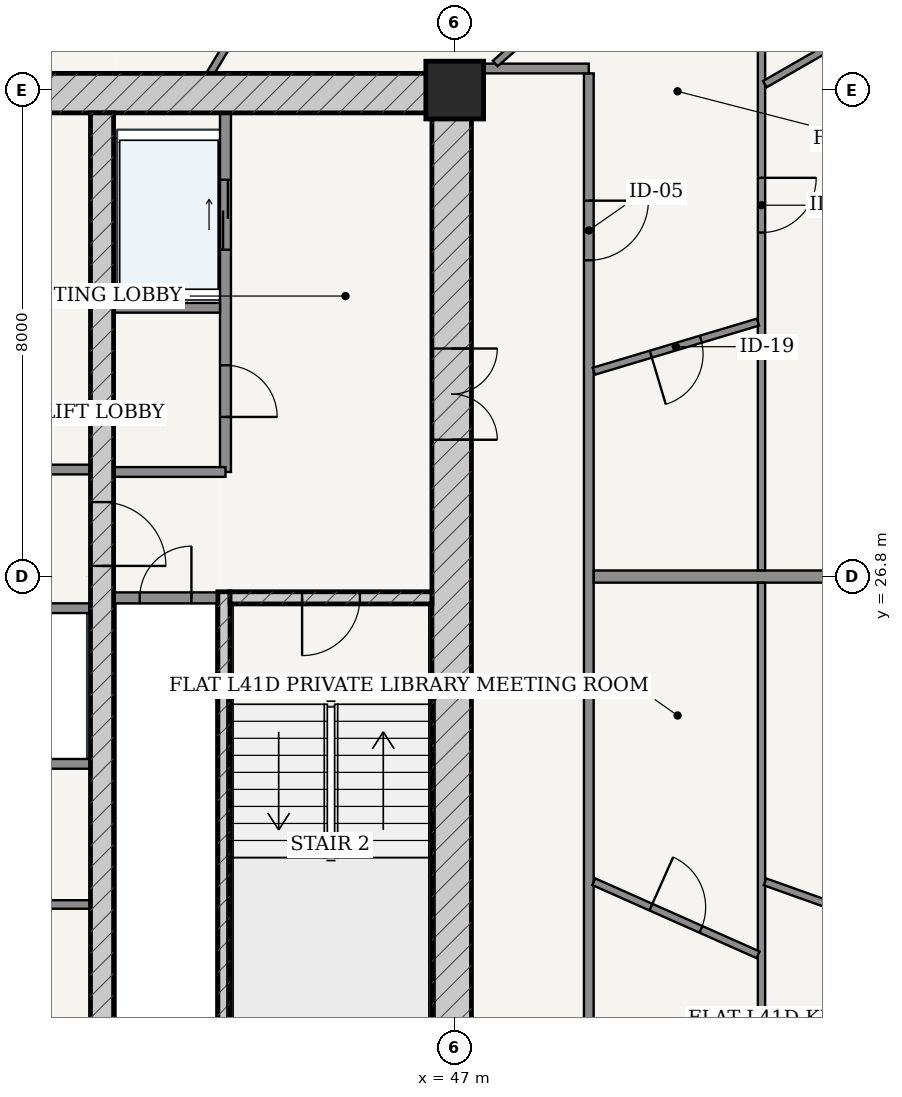
"""IFC4 building model, lengths in metres.
Left out: names, types, materials, properties, quantities, classifications, styles, units other than length and angle.
Written with IfcOpenShell. Run it as: python <this file> out.ifc"""

import sys

from ifc_helpers import new_model, si_unit, direction, frame, frame_2d, origin, origin_2d, place, context, subcontext, project, spatial, rectangle, extrude, source, transform, mapped, element, fill, save


model = new_model("IFC4")
c1 = context("Model", 3, precision=1e-05, world=origin(), true_north=direction((-0.2419218956, 0.970295726276)))
c2 = subcontext(c1, "Body", "Model", "MODEL_VIEW")
j1 = project(units=[si_unit("LENGTHUNIT", "METRE"), si_unit("PLANEANGLEUNIT", "RADIAN")], contexts=[c1])
p1 = place(None, origin())
s1 = spatial("IfcSite", under=j1, at=p1, CompositionType="ELEMENT")
p2 = place(p1, origin())
s2 = spatial("IfcBuilding", under=s1, at=p2, CompositionType="ELEMENT")
p3 = place(p2, frame((0.0, 0.0, 157.0)))
s3 = spatial("IfcBuildingStorey", under=s2, at=p3, CompositionType="ELEMENT", Elevation=157.0)
p4 = place(p3, frame((47.0, 34.8, 0.0), z_axis=(0.0, 0.0, 1.0), x_axis=(1.0, 0.0, 0.0)))
e1 = element("IfcColumn", 1, at=p4, inside=s3, PredefinedType="COLUMN", context=c2, shape_type="SweptSolid", body=[
    extrude(rectangle(XDim=0.95, YDim=0.95, at=origin_2d()), origin(), (0.0, 0.0, 1.0), 3.6),
])
p5 = place(p3, frame((28.725, 34.75, 0.0), z_axis=(0.0, 0.0, 1.0), x_axis=(1.0, 0.0, 0.0)))
e2 = element("IfcWall", 2, at=p5, inside=s3, PredefinedType="SHEAR", context=c2, shape_type="SweptSolid", body=[
    extrude(rectangle(XDim=18.55, YDim=0.65, at=frame_2d((9.275, 0.0))), origin(), (0.0, 0.0, 1.0), 3.33),
])
p6 = place(p3, frame((46.95, 19.175, 0.0), z_axis=(0.0, 0.0, 1.0), x_axis=(0.0, 1.0, 0.0)))
e3 = element("IfcWall", 3, at=p6, inside=s3, PredefinedType="SHEAR", context=c2, shape_type="SweptSolid", body=[
    extrude(rectangle(XDim=15.25, YDim=0.65, at=frame_2d((7.625, 0.0))), origin(), (0.0, 0.0, 1.0), 3.33),
])
p7 = place(p6, frame((9.875, 0.0, 0.0)))
e4 = element("IfcOpeningElement", 4, at=p7, cuts=e3, PredefinedType="OPENING", context=c2, shape_type="SweptSolid", body=[
    extrude(rectangle(XDim=1.5, YDim=2.2, at=frame_2d((0.75, 1.1))), frame((0.0, 0.335, 0.0), z_axis=(0.0, -1.0, 0.0), x_axis=(1.0, 0.0, 0.0)), (0.0, 0.0, 1.0), 0.67),
])
p8 = place(p3, frame((43.205, 19.175, 0.0), z_axis=(0.0, 0.0, 1.0), x_axis=(0.0, 1.0, 0.0)))
e5 = element("IfcWall", 5, at=p8, inside=s3, PredefinedType="SOLIDWALL", context=c2, shape_type="SweptSolid", body=[
    extrude(rectangle(XDim=7.375, YDim=0.2, at=frame_2d((3.688, 0.0))), origin(), (0.0, 0.0, 1.0), 3.33),
])
p9 = place(p3, frame((43.305, 26.45, 0.0), z_axis=(0.0, 0.0, 1.0), x_axis=(1.0, 0.0, 0.0)))
e6 = element("IfcWall", 6, at=p9, inside=s3, PredefinedType="SOLIDWALL", context=c2, shape_type="SweptSolid", body=[
    extrude(rectangle(XDim=3.32, YDim=0.2, at=frame_2d((1.66, 0.0))), origin(), (0.0, 0.0, 1.0), 3.33),
])
p10 = place(p9, frame((1.185, 0.0, 0.0)))
e7 = element("IfcOpeningElement", 7, at=p10, cuts=e6, PredefinedType="OPENING", context=c2, shape_type="SweptSolid", body=[
    extrude(rectangle(XDim=0.95, YDim=2.15, at=frame_2d((0.475, 1.075))), frame((0.0, 0.11, 0.0), z_axis=(0.0, -1.0, 0.0), x_axis=(1.0, 0.0, 0.0)), (0.0, 0.0, 1.0), 0.22),
])
p11 = place(p3, frame((41.2, 19.175, 0.0), z_axis=(0.0, 0.0, 1.0), x_axis=(0.0, 1.0, 0.0)))
e8 = element("IfcWall", 8, at=p11, inside=s3, PredefinedType="SHEAR", context=c2, shape_type="SweptSolid", body=[
    extrude(rectangle(XDim=15.25, YDim=0.38, at=frame_2d((7.625, 0.0))), origin(), (0.0, 0.0, 1.0), 3.33),
])
p12 = place(p11, frame((7.8, 0.0, 0.0)))
e9 = element("IfcOpeningElement", 9, at=p12, cuts=e8, PredefinedType="OPENING", context=c2, shape_type="SweptSolid", body=[
    extrude(rectangle(XDim=1.05, YDim=2.15, at=frame_2d((0.525, 1.075))), frame((0.0, 0.2, 0.0), z_axis=(0.0, -1.0, 0.0), x_axis=(1.0, 0.0, 0.0)), (0.0, 0.0, 1.0), 0.4),
])
p13 = place(p3, frame((41.39, 26.45, 0.0), z_axis=(0.0, 0.0, 1.0), x_axis=(1.0, 0.0, 0.0)))
e10 = element("IfcWall", 10, at=p13, inside=s3, PredefinedType="PARTITIONING", context=c2, shape_type="SweptSolid", body=[
    extrude(rectangle(XDim=1.71, YDim=0.18, at=frame_2d((0.855, 0.0))), origin(), (0.0, 0.0, 1.0), 3.33),
])
p14 = place(p13, frame((0.43, 0.0, 0.0)))
e11 = element("IfcOpeningElement", 11, at=p14, cuts=e10, PredefinedType="OPENING", context=c2, shape_type="SweptSolid", body=[
    extrude(rectangle(XDim=0.85, YDim=2.1, at=frame_2d((0.425, 1.05))), frame((0.0, 0.1, 0.0), z_axis=(0.0, -1.0, 0.0), x_axis=(1.0, 0.0, 0.0)), (0.0, 0.0, 1.0), 0.2),
])
p15 = place(p3, frame((43.23, 28.52, 0.0), z_axis=(0.0, 0.0, 1.0), x_axis=(0.0, 1.0, 0.0)))
e12 = element("IfcWall", 12, at=p15, inside=s3, PredefinedType="PARTITIONING", context=c2, shape_type="SweptSolid", body=[
    extrude(rectangle(XDim=5.905, YDim=0.18, at=frame_2d((2.953, 0.0))), origin(), (0.0, 0.0, 1.0), 3.33),
])
p16 = place(p15, frame((0.905, 0.0, 0.0)))
e13 = element("IfcOpeningElement", 13, at=p16, cuts=e12, PredefinedType="OPENING", context=c2, shape_type="SweptSolid", body=[
    extrude(rectangle(XDim=0.85, YDim=2.1, at=frame_2d((0.425, 1.05))), frame((0.0, 0.1, 0.0), z_axis=(0.0, -1.0, 0.0), x_axis=(1.0, 0.0, 0.0)), (0.0, 0.0, 1.0), 0.2),
])
p17 = place(p15, frame((3.655, 0.0, 0.0)))
e14 = element("IfcOpeningElement", 14, at=p17, cuts=e12, PredefinedType="OPENING", context=c2, shape_type="SweptSolid", body=[
    extrude(rectangle(XDim=1.15, YDim=2.2, at=frame_2d((0.575, 1.1))), frame((0.0, 0.1, 0.0), z_axis=(0.0, -1.0, 0.0), x_axis=(1.0, 0.0, 0.0)), (0.0, 0.0, 1.0), 0.2),
])
p18 = place(p3, frame((41.39, 31.22, 0.0), z_axis=(0.0, 0.0, 1.0), x_axis=(1.0, 0.0, 0.0)))
e15 = element("IfcWall", 15, at=p18, inside=s3, PredefinedType="PARTITIONING", context=c2, shape_type="SweptSolid", body=[
    extrude(rectangle(XDim=1.75, YDim=0.16, at=frame_2d((0.875, 0.0))), origin(), (0.0, 0.0, 1.0), 3.33),
])
p19 = place(p3, frame((41.39, 28.52, 0.0), z_axis=(0.0, 0.0, 1.0), x_axis=(1.0, 0.0, 0.0)))
e16 = element("IfcWall", 16, at=p19, inside=s3, PredefinedType="PARTITIONING", context=c2, shape_type="SweptSolid", body=[
    extrude(rectangle(XDim=1.84, YDim=0.16, at=frame_2d((0.92, 0.0))), origin(), (0.0, 0.0, 1.0), 3.33),
])
p20 = place(p3, frame((34.99, 28.56, 0.0), z_axis=(0.0, 0.0, 1.0), x_axis=(1.0, 0.0, 0.0)))
e17 = element("IfcWall", 17, at=p20, inside=s3, PredefinedType="PARTITIONING", context=c2, shape_type="SweptSolid", body=[
    extrude(rectangle(XDim=6.02, YDim=0.16, at=frame_2d((3.01, 0.0))), origin(), (0.0, 0.0, 1.0), 3.33),
])
p21 = place(p20, frame((2.585, 0.0, 0.0)))
e18 = element("IfcOpeningElement", 18, at=p21, cuts=e17, PredefinedType="OPENING", context=c2, shape_type="SweptSolid", body=[
    extrude(rectangle(XDim=0.85, YDim=2.1, at=frame_2d((0.425, 1.05))), frame((0.0, 0.09, 0.0), z_axis=(0.0, -1.0, 0.0), x_axis=(1.0, 0.0, 0.0)), (0.0, 0.0, 1.0), 0.18),
])
p22 = place(p3, frame((34.99, 26.28, 0.0), z_axis=(0.0, 0.0, 1.0), x_axis=(1.0, 0.0, 0.0)))
e19 = element("IfcWall", 19, at=p22, inside=s3, PredefinedType="PARTITIONING", context=c2, shape_type="SweptSolid", body=[
    extrude(rectangle(XDim=6.02, YDim=0.16, at=frame_2d((3.01, 0.0))), origin(), (0.0, 0.0, 1.0), 3.33),
])
p23 = place(p22, frame((0.225, 0.0, 0.0)))
e20 = element("IfcOpeningElement", 20, at=p23, cuts=e19, PredefinedType="OPENING", context=c2, shape_type="SweptSolid", body=[
    extrude(rectangle(XDim=1.1, YDim=2.2, at=frame_2d((0.55, 1.1))), frame((0.0, 0.09, 0.0), z_axis=(0.0, -1.0, 0.0), x_axis=(1.0, 0.0, 0.0)), (0.0, 0.0, 1.0), 0.18),
])
p24 = place(p22, frame((1.705, 0.0, 0.0)))
e21 = element("IfcOpeningElement", 21, at=p24, cuts=e19, PredefinedType="OPENING", context=c2, shape_type="SweptSolid", body=[
    extrude(rectangle(XDim=1.1, YDim=2.2, at=frame_2d((0.55, 1.1))), frame((0.0, 0.09, 0.0), z_axis=(0.0, -1.0, 0.0), x_axis=(1.0, 0.0, 0.0)), (0.0, 0.0, 1.0), 0.18),
])
p25 = place(p3, frame((34.99, 23.72, 0.0), z_axis=(0.0, 0.0, 1.0), x_axis=(1.0, 0.0, 0.0)))
e22 = element("IfcWall", 22, at=p25, inside=s3, PredefinedType="PARTITIONING", context=c2, shape_type="SweptSolid", body=[
    extrude(rectangle(XDim=6.02, YDim=0.16, at=frame_2d((3.01, 0.0))), origin(), (0.0, 0.0, 1.0), 3.33),
])
p26 = place(p3, frame((34.99, 21.407, 0.0), z_axis=(0.0, 0.0, 1.0), x_axis=(1.0, 0.0, 0.0)))
e23 = element("IfcWall", 23, at=p26, inside=s3, PredefinedType="PARTITIONING", context=c2, shape_type="SweptSolid", body=[
    extrude(rectangle(XDim=6.02, YDim=0.14, at=frame_2d((3.01, 0.0))), origin(), (0.0, 0.0, 1.0), 3.33),
])
p27 = place(p26, frame((2.585, 0.0, 0.0)))
e24 = element("IfcOpeningElement", 24, at=p27, cuts=e23, PredefinedType="OPENING", context=c2, shape_type="SweptSolid", body=[
    extrude(rectangle(XDim=0.85, YDim=2.1, at=frame_2d((0.425, 1.05))), frame((0.0, 0.08, 0.0), z_axis=(0.0, -1.0, 0.0), x_axis=(1.0, 0.0, 0.0)), (0.0, 0.0, 1.0), 0.16),
])
p28 = place(p3, frame((49.205, 16.675, 0.0), z_axis=(0.0, 0.0, 1.0), x_axis=(0.0, 1.0, 0.0)))
e25 = element("IfcWall", 25, at=p28, inside=s3, PredefinedType="PARTITIONING", context=c2, shape_type="SweptSolid", body=[
    extrude(rectangle(XDim=18.4, YDim=0.16, at=frame_2d((9.2, 0.0))), origin(), (0.0, 0.0, 1.0), 2.776),
])
p29 = place(p28, frame((15.326, 0.0, 0.0)))
e26 = element("IfcOpeningElement", 26, at=p29, cuts=e25, PredefinedType="OPENING", context=c2, shape_type="SweptSolid", body=[
    extrude(rectangle(XDim=0.98, YDim=2.2, at=frame_2d((0.49, 1.1))), frame((0.0, 0.09, 0.0), z_axis=(0.0, -1.0, 0.0), x_axis=(1.0, 0.0, 0.0)), (0.0, 0.0, 1.0), 0.18),
])
p30 = place(p3, frame((47.275, 35.155, 0.0), z_axis=(0.0, 0.0, 1.0), x_axis=(1.0, 0.0, 0.0)))
e27 = element("IfcWall", 27, at=p30, inside=s3, PredefinedType="PARTITIONING", context=c2, shape_type="SweptSolid", body=[
    extrude(rectangle(XDim=1.93, YDim=0.16, at=frame_2d((0.965, 0.0))), origin(), (0.0, 0.0, 1.0), 2.776),
])
p31 = place(p3, frame((49.287, 26.8, 0.0), z_axis=(0.0, 0.0, 1.0), x_axis=(1.0, 0.0, 0.0)))
e28 = element("IfcWall", 28, at=p31, inside=s3, PredefinedType="PARTITIONING", context=c2, shape_type="SweptSolid", body=[
    extrude(rectangle(XDim=12.853, YDim=0.2, at=frame_2d((6.426, 0.0))), origin(), (0.0, 0.0, 1.0), 2.846),
])
p32 = place(p3, frame((52.045, 37.995, 0.0), z_axis=(0.0, 0.0, 1.0), x_axis=(0.0, -1.0, 0.0)))
e29 = element("IfcWall", 29, at=p32, inside=s3, PredefinedType="PARTITIONING", context=c2, shape_type="SweptSolid", body=[
    extrude(rectangle(XDim=11.093, YDim=0.12, at=frame_2d((5.546, 0.0))), origin(), (0.0, 0.0, 1.0), 2.776),
])
p33 = place(p32, frame((4.638, 0.0, 0.0)))
e30 = element("IfcOpeningElement", 30, at=p33, cuts=e29, PredefinedType="OPENING", context=c2, shape_type="SweptSolid", body=[
    extrude(rectangle(XDim=0.9, YDim=2.15, at=frame_2d((0.45, 1.075))), frame((0.0, 0.07, 0.0), z_axis=(0.0, -1.0, 0.0), x_axis=(1.0, 0.0, 0.0)), (0.0, 0.0, 1.0), 0.14),
])
p34 = place(p3, frame((52.099, 34.897, 0.0), z_axis=(0.0, 0.0, 1.0), x_axis=(0.867170536447, 0.498011305813, 0.0)))
e31 = element("IfcWall", 31, at=p34, inside=s3, PredefinedType="PARTITIONING", context=c2, shape_type="SweptSolid", body=[
    extrude(rectangle(XDim=6.834, YDim=0.12, at=frame_2d((3.417, 0.0))), origin(), (0.0, 0.0, 1.0), 2.776),
])
p35 = place(p34, frame((1.969, 0.0, 0.0)))
e32 = element("IfcOpeningElement", 32, at=p35, cuts=e31, PredefinedType="OPENING", context=c2, shape_type="SweptSolid", body=[
    extrude(rectangle(XDim=0.9, YDim=2.15, at=frame_2d((0.45, 1.075))), frame((0.0, 0.07, 0.0), z_axis=(0.0, -1.0, 0.0), x_axis=(1.0, 0.0, 0.0)), (0.0, 0.0, 1.0), 0.14),
])
p36 = place(p3, frame((49.287, 30.177, 0.0), z_axis=(0.0, 0.0, 1.0), x_axis=(0.958045462778, 0.28661627876, 0.0)))
e33 = element("IfcWall", 33, at=p36, inside=s3, PredefinedType="PARTITIONING", context=c2, shape_type="SweptSolid", body=[
    extrude(rectangle(XDim=2.817, YDim=0.12, at=frame_2d((1.408, 0.0))), origin(), (0.0, 0.0, 1.0), 3.33),
])
p37 = place(p36, frame((0.979, 0.0, 0.0)))
e34 = element("IfcOpeningElement", 34, at=p37, cuts=e33, PredefinedType="OPENING", context=c2, shape_type="SweptSolid", body=[
    extrude(rectangle(XDim=0.86, YDim=2.15, at=frame_2d((0.43, 1.075))), frame((0.0, 0.07, 0.0), z_axis=(0.0, -1.0, 0.0), x_axis=(1.0, 0.0, 0.0)), (0.0, 0.0, 1.0), 0.14),
])
p38 = place(p3, frame((47.665, 35.236, 0.0), z_axis=(0.0, 0.0, 1.0), x_axis=(0.753384754287, 0.657579966246, 0.0)))
e35 = element("IfcWall", 35, at=p38, inside=s3, PredefinedType="PARTITIONING", context=c2, shape_type="SweptSolid", body=[
    extrude(rectangle(XDim=4.133, YDim=0.12, at=frame_2d((2.067, 0.0))), origin(), (0.0, 0.0, 1.0), 3.005),
])
p39 = place(p38, frame((1.617, 0.0, 0.0)))
e36 = element("IfcOpeningElement", 36, at=p39, cuts=e35, PredefinedType="OPENING", context=c2, shape_type="SweptSolid", body=[
    extrude(rectangle(XDim=0.9, YDim=2.15, at=frame_2d((0.45, 1.075))), frame((0.0, 0.07, 0.0), z_axis=(0.0, -1.0, 0.0), x_axis=(1.0, 0.0, 0.0)), (0.0, 0.0, 1.0), 0.14),
])
p40 = place(p3, frame((42.98, 35.075, 0.0), z_axis=(0.0, 0.0, 1.0), x_axis=(0.515686235332, 0.856777512946, 0.0)))
e37 = element("IfcWall", 37, at=p40, inside=s3, PredefinedType="PARTITIONING", context=c2, shape_type="SweptSolid", body=[
    extrude(rectangle(XDim=3.346, YDim=0.12, at=frame_2d((1.673, 0.0))), origin(), (0.0, 0.0, 1.0), 3.33),
])
p41 = place(p3, frame((52.045, 26.698, 0.0), z_axis=(0.0, 0.0, 1.0), x_axis=(0.0, -1.0, 0.0)))
e38 = element("IfcWall", 38, at=p41, inside=s3, PredefinedType="PARTITIONING", context=c2, shape_type="SweptSolid", body=[
    extrude(rectangle(XDim=12.943, YDim=0.12, at=frame_2d((6.472, 0.0))), origin(), (0.0, 0.0, 1.0), 2.776),
])
p42 = place(p41, frame((8.503, 0.0, 0.0)))
e39 = element("IfcOpeningElement", 39, at=p42, cuts=e38, PredefinedType="OPENING", context=c2, shape_type="SweptSolid", body=[
    extrude(rectangle(XDim=0.9, YDim=2.15, at=frame_2d((0.45, 1.075))), frame((0.0, 0.07, 0.0), z_axis=(0.0, -1.0, 0.0), x_axis=(1.0, 0.0, 0.0)), (0.0, 0.0, 1.0), 0.14),
])
p43 = place(p3, frame((52.104, 21.779, 0.0), z_axis=(0.0, 0.0, 1.0), x_axis=(0.942081743482, -0.335383345736, 0.0)))
e40 = element("IfcWall", 40, at=p43, inside=s3, PredefinedType="PARTITIONING", context=c2, shape_type="SweptSolid", body=[
    extrude(rectangle(XDim=8.7, YDim=0.12, at=frame_2d((4.35, 0.0))), origin(), (0.0, 0.0, 1.0), 2.846),
])
p44 = place(p43, frame((3.9, 0.0, 0.0)))
e41 = element("IfcOpeningElement", 41, at=p44, cuts=e40, PredefinedType="OPENING", context=c2, shape_type="SweptSolid", body=[
    extrude(rectangle(XDim=0.9, YDim=2.15, at=frame_2d((0.45, 1.075))), frame((0.0, 0.07, 0.0), z_axis=(0.0, -1.0, 0.0), x_axis=(1.0, 0.0, 0.0)), (0.0, 0.0, 1.0), 0.14),
])
p45 = place(p3, frame((49.287, 21.781, 0.0), z_axis=(0.0, 0.0, 1.0), x_axis=(0.913743428873, -0.406291700864, 0.0)))
e42 = element("IfcWall", 42, at=p45, inside=s3, PredefinedType="PARTITIONING", context=c2, shape_type="SweptSolid", body=[
    extrude(rectangle(XDim=2.957, YDim=0.12, at=frame_2d((1.478, 0.0))), origin(), (0.0, 0.0, 1.0), 3.33),
])
p46 = place(p45, frame((1.028, 0.0, 0.0)))
e43 = element("IfcOpeningElement", 43, at=p46, cuts=e42, PredefinedType="OPENING", context=c2, shape_type="SweptSolid", body=[
    extrude(rectangle(XDim=0.9, YDim=2.15, at=frame_2d((0.45, 1.075))), frame((0.0, 0.07, 0.0), z_axis=(0.0, -1.0, 0.0), x_axis=(1.0, 0.0, 0.0)), (0.0, 0.0, 1.0), 0.14),
])
m1 = source(origin(), c2, "Body", "SweptSolid", [
    extrude(rectangle(XDim=1.5, YDim=2.2, at=frame_2d((0.75, 1.1))), frame((0.0, 0.025, 0.0), z_axis=(0.0, -1.0, 0.0), x_axis=(1.0, 0.0, 0.0)), (0.0, 0.0, 1.0), 0.05),
])
p47 = place(p7, frame((1.5, 0.0, 0.0), z_axis=(0.0, 0.0, 1.0), x_axis=(-1.0, 0.0, 0.0)))
e44 = element("IfcDoor", 44, at=p47, inside=s3, OperationType="DOUBLE_DOOR_SINGLE_SWING", PredefinedType="DOOR", context=c2, shape_type="MappedRepresentation", body=[
    mapped(m1, transform((0.0, 0.0, 0.0), scale=1.0)),
])
fill(e4, e44)
m2 = source(origin(), c2, "Body", "SweptSolid", [
    extrude(rectangle(XDim=1.05, YDim=2.15, at=frame_2d((0.525, 1.075))), frame((0.0, 0.025, 0.0), z_axis=(0.0, -1.0, 0.0), x_axis=(1.0, 0.0, 0.0)), (0.0, 0.0, 1.0), 0.05),
])
p48 = place(p12, frame((1.05, 0.0, 0.0), z_axis=(0.0, 0.0, 1.0), x_axis=(-1.0, 0.0, 0.0)))
e45 = element("IfcDoor", 45, at=p48, inside=s3, OperationType="SINGLE_SWING_RIGHT", PredefinedType="DOOR", context=c2, shape_type="MappedRepresentation", body=[
    mapped(m2, transform((0.0, 0.0, 0.0), scale=1.0)),
])
fill(e9, e45)
m3 = source(origin(), c2, "Body", "SweptSolid", [
    extrude(rectangle(XDim=0.95, YDim=2.15, at=frame_2d((0.475, 1.075))), frame((0.0, 0.025, 0.0), z_axis=(0.0, -1.0, 0.0), x_axis=(1.0, 0.0, 0.0)), (0.0, 0.0, 1.0), 0.05),
])
p49 = place(p10, frame((0.95, 0.0, 0.0), z_axis=(0.0, 0.0, 1.0), x_axis=(-1.0, 0.0, 0.0)))
e46 = element("IfcDoor", 46, at=p49, inside=s3, OperationType="SINGLE_SWING_RIGHT", PredefinedType="DOOR", context=c2, shape_type="MappedRepresentation", body=[
    mapped(m3, transform((0.0, 0.0, 0.0), scale=1.0)),
])
fill(e7, e46)
m4 = source(origin(), c2, "Body", "SweptSolid", [
    extrude(rectangle(XDim=0.85, YDim=2.1, at=frame_2d((0.425, 1.05))), frame((0.0, 0.025, 0.0), z_axis=(0.0, -1.0, 0.0), x_axis=(1.0, 0.0, 0.0)), (0.0, 0.0, 1.0), 0.05),
])
p50 = place(p14, origin())
e47 = element("IfcDoor", 47, at=p50, inside=s3, OperationType="SINGLE_SWING_RIGHT", PredefinedType="DOOR", context=c2, shape_type="MappedRepresentation", body=[
    mapped(m4, transform((0.0, 0.0, 0.0), scale=1.0)),
])
fill(e11, e47)
p51 = place(p16, frame((0.85, 0.0, 0.0), z_axis=(0.0, 0.0, 1.0), x_axis=(-1.0, 0.0, 0.0)))
e48 = element("IfcDoor", 48, at=p51, inside=s3, OperationType="SINGLE_SWING_RIGHT", PredefinedType="DOOR", context=c2, shape_type="MappedRepresentation", body=[
    mapped(m4, transform((0.0, 0.0, 0.0), scale=1.0)),
])
fill(e13, e48)
m5 = source(origin(), c2, "Body", "SweptSolid", [
    extrude(rectangle(XDim=1.15, YDim=2.2, at=frame_2d((0.575, 1.1))), frame((0.0, 0.025, 0.0), z_axis=(0.0, -1.0, 0.0), x_axis=(1.0, 0.0, 0.0)), (0.0, 0.0, 1.0), 0.05),
])
p52 = place(p17, origin())
e49 = element("IfcDoor", 49, at=p52, inside=s3, OperationType="DOUBLE_DOOR_SLIDING", PredefinedType="DOOR", context=c2, shape_type="MappedRepresentation", body=[
    mapped(m5, transform((0.0, 0.0, 0.0), scale=1.0)),
])
fill(e14, e49)
m6 = source(origin(), c2, "Body", "SweptSolid", [
    extrude(rectangle(XDim=0.98, YDim=2.2, at=frame_2d((0.49, 1.1))), frame((0.0, 0.025, 0.0), z_axis=(0.0, -1.0, 0.0), x_axis=(1.0, 0.0, 0.0)), (0.0, 0.0, 1.0), 0.05),
])
p53 = place(p29, frame((0.98, 0.0, 0.0), z_axis=(0.0, 0.0, 1.0), x_axis=(-1.0, 0.0, 0.0)))
e50 = element("IfcDoor", 50, at=p53, inside=s3, OperationType="SINGLE_SWING_LEFT", PredefinedType="DOOR", context=c2, shape_type="MappedRepresentation", body=[
    mapped(m6, transform((0.0, 0.0, 0.0), scale=1.0)),
])
fill(e26, e50)
m7 = source(origin(), c2, "Body", "SweptSolid", [
    extrude(rectangle(XDim=0.86, YDim=2.15, at=frame_2d((0.43, 1.075))), frame((0.0, 0.025, 0.0), z_axis=(0.0, -1.0, 0.0), x_axis=(1.0, 0.0, 0.0)), (0.0, 0.0, 1.0), 0.05),
])
p54 = place(p37, frame((0.86, 0.0, 0.0), z_axis=(0.0, 0.0, 1.0), x_axis=(-1.0, 0.0, 0.0)))
e51 = element("IfcDoor", 51, at=p54, inside=s3, OperationType="SINGLE_SWING_RIGHT", PredefinedType="DOOR", context=c2, shape_type="MappedRepresentation", body=[
    mapped(m7, transform((0.0, 0.0, 0.0), scale=1.0)),
])
fill(e34, e51)
m8 = source(origin(), c2, "Body", "SweptSolid", [
    extrude(rectangle(XDim=0.9, YDim=2.15, at=frame_2d((0.45, 1.075))), frame((0.0, 0.025, 0.0), z_axis=(0.0, -1.0, 0.0), x_axis=(1.0, 0.0, 0.0)), (0.0, 0.0, 1.0), 0.05),
])
p55 = place(p33, origin())
e52 = element("IfcDoor", 52, at=p55, inside=s3, OperationType="SINGLE_SWING_LEFT", PredefinedType="DOOR", context=c2, shape_type="MappedRepresentation", body=[
    mapped(m8, transform((0.0, 0.0, 0.0), scale=1.0)),
])
fill(e30, e52)
p56 = place(p46, origin())
e53 = element("IfcDoor", 53, at=p56, inside=s3, OperationType="SINGLE_SWING_LEFT", PredefinedType="DOOR", context=c2, shape_type="MappedRepresentation", body=[
    mapped(m8, transform((0.0, 0.0, 0.0), scale=1.0)),
])
fill(e43, e53)
save(model, sys.argv[1])
